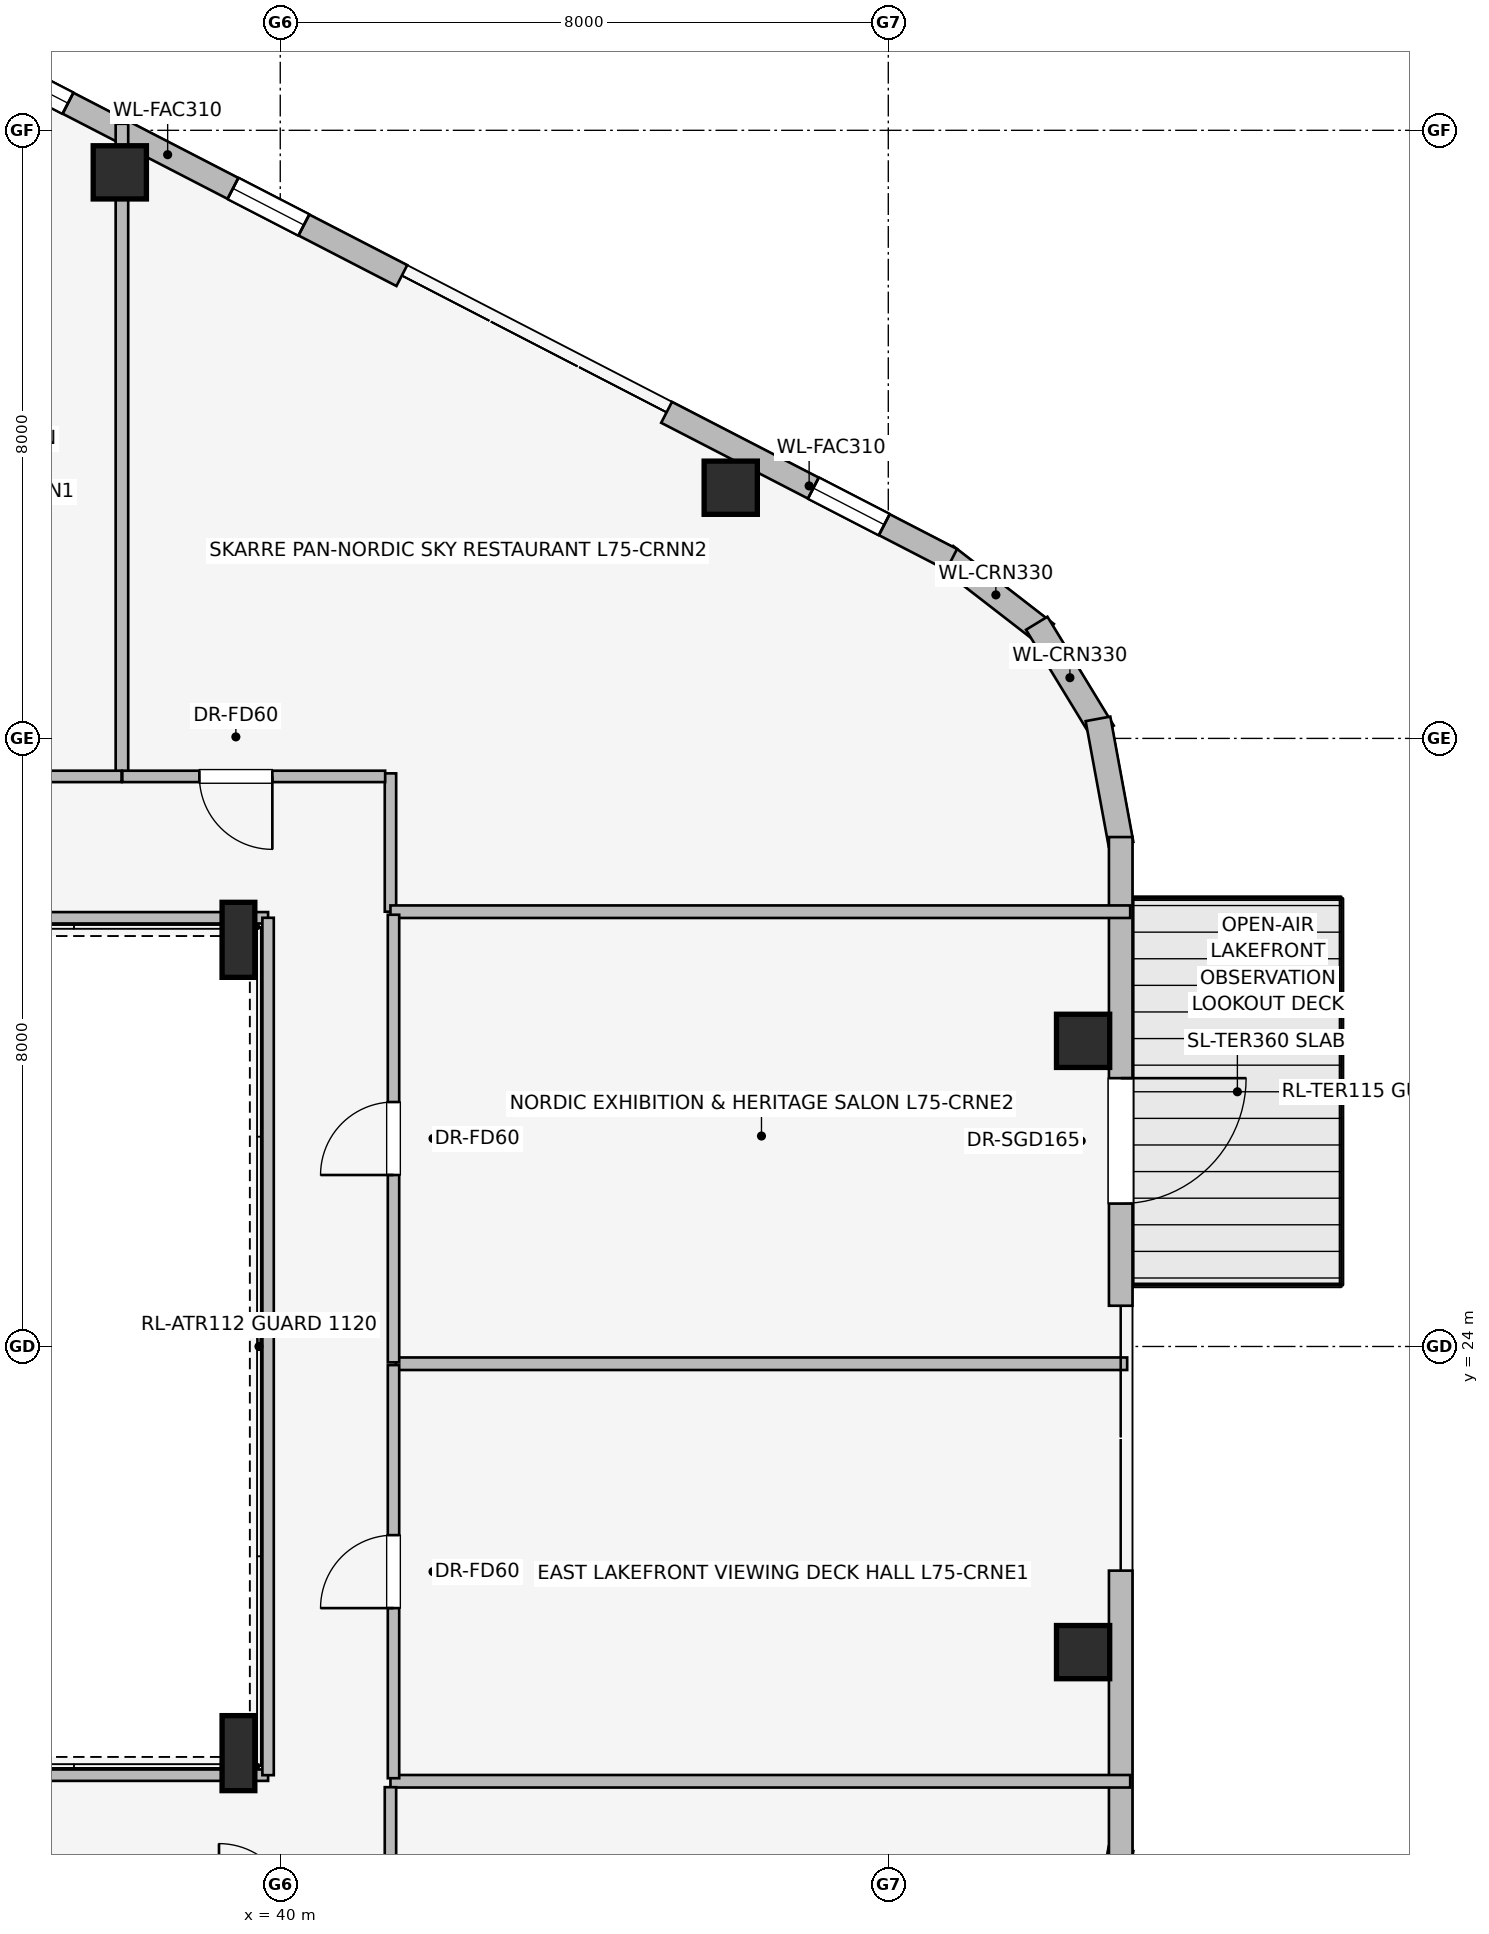
"""IFC4 building model, lengths in metres.
Left out: names, types, materials, properties, quantities, classifications, styles, units other than length and angle.
Written with IfcOpenShell. Run it as: python <this file> out.ifc"""

import sys

from ifc_helpers import new_model, si_unit, direction, frame, frame_2d, origin, origin_2d, place, context, subcontext, project, spatial, rectangle, i_section, extrude, element, fill, save


model = new_model("IFC4")
c1 = context("Model", 3, precision=1e-05, world=origin(), true_north=direction((0.0, 1.0)))
c2 = subcontext(c1, "Body", "Model", "MODEL_VIEW")
j1 = project(units=[si_unit("LENGTHUNIT", "METRE"), si_unit("PLANEANGLEUNIT", "RADIAN")], contexts=[c1])
p1 = place(None, origin())
s1 = spatial("IfcSite", under=j1, at=p1, CompositionType="ELEMENT")
p2 = place(p1, origin())
s2 = spatial("IfcBuilding", under=s1, at=p2, CompositionType="ELEMENT")
p3 = place(p2, frame((0.0, 0.0, 275.1)))
s3 = spatial("IfcBuildingStorey", under=s2, at=p3, CompositionType="ELEMENT", Elevation=275.1)
for number, where, z_axis, x_axis in (
    (1, (45.927, 35.298, 0.0), (0.0, 0.0, 1.0), (1.0, 0.0, 0.0)),
    (2, (37.889, 39.447, 0.0), (0.0, 0.0, 1.0), (1.0, 0.0, 0.0)),
    (3, (50.563, 19.979, 0.0), (0.0, 0.0, 1.0), (1.0, 0.0, 0.0)),
    (4, (50.563, 28.021, 0.0), (0.0, 0.0, 1.0), (1.0, 0.0, 0.0)),
):
    element("IfcColumn", number, at=place(p3, frame(where, z_axis=z_axis, x_axis=x_axis)), inside=s3, PredefinedType="COLUMN", context=c2, shape_type="SweptSolid", body=[
        extrude(rectangle(XDim=0.7, YDim=0.7, at=origin_2d()), origin(), (0.0, 0.0, 1.0), 4.8),
    ])
for number, where, z_axis, x_axis in (
    (5, (39.45, 18.65, 0.0), (0.0, 0.0, 1.0), (1.0, 0.0, 0.0)),
    (6, (39.45, 29.35, 0.0), (0.0, 0.0, 1.0), (1.0, 0.0, 0.0)),
):
    element("IfcColumn", number, at=place(p3, frame(where, z_axis=z_axis, x_axis=x_axis)), inside=s3, PredefinedType="COLUMN", context=c2, shape_type="SweptSolid", body=[
        extrude(i_section(OverallWidth=0.431, OverallDepth=0.987, WebThickness=0.034, FlangeThickness=0.062, at=origin_2d()), origin(), (0.0, 0.0, 1.0), 4.8),
    ])
p4 = place(p3, frame((48.753, 34.401, 0.0), z_axis=(0.0, 0.0, 1.0), x_axis=(0.790691856293, -0.61221433207, 0.0)))
e7 = element("IfcWall", 7, at=p4, inside=s3, PredefinedType="STANDARD", context=c2, shape_type="SweptSolid", body=[
    extrude(rectangle(XDim=1.676, YDim=0.33, at=frame_2d((0.838, 0.0))), origin(), (0.0, 0.0, 1.0), 4.49),
])
p5 = place(p3, frame((49.953, 33.515, 0.0), z_axis=(0.0, 0.0, 1.0), x_axis=(0.520325409202, -0.853968072318, 0.0)))
e8 = element("IfcWall", 8, at=p5, inside=s3, PredefinedType="STANDARD", context=c2, shape_type="SweptSolid", body=[
    extrude(rectangle(XDim=1.678, YDim=0.33, at=frame_2d((0.839, 0.0))), origin(), (0.0, 0.0, 1.0), 4.49),
])
p6 = place(p3, frame((50.759, 32.257, 0.0), z_axis=(0.0, 0.0, 1.0), x_axis=(0.180691763044, -0.983539773862, 0.0)))
e9 = element("IfcWall", 9, at=p6, inside=s3, PredefinedType="STANDARD", context=c2, shape_type="SweptSolid", body=[
    extrude(rectangle(XDim=1.677, YDim=0.33, at=frame_2d((0.838, 0.0))), origin(), (0.0, 0.0, 1.0), 4.49),
])
p7 = place(p3, frame((35.437, 41.27, 0.0), z_axis=(0.0, 0.0, 1.0), x_axis=(0.888622971019, -0.458638436437, 0.0)))
e10 = element("IfcWall", 10, at=p7, inside=s3, PredefinedType="STANDARD", context=c2, shape_type="SweptSolid", body=[
    extrude(rectangle(XDim=6.936, YDim=0.31, at=frame_2d((3.468, 0.0))), origin(), (0.0, 0.0, 1.0), 4.49),
])
p8 = place(p7, frame((0.942, 0.0, 0.75)))
e11 = element("IfcOpeningElement", 11, at=p8, cuts=e10, PredefinedType="OPENING", context=c2, shape_type="SweptSolid", body=[
    extrude(rectangle(XDim=1.05, YDim=1.4, at=frame_2d((0.525, 0.7))), frame((0.0, 0.165, 0.0), z_axis=(0.0, -1.0, 0.0), x_axis=(1.0, 0.0, 0.0)), (0.0, 0.0, 1.0), 0.33),
])
p9 = place(p7, frame((4.435, 0.0, 0.75)))
e12 = element("IfcOpeningElement", 12, at=p9, cuts=e10, PredefinedType="OPENING", context=c2, shape_type="SweptSolid", body=[
    extrude(rectangle(XDim=1.05, YDim=1.4, at=frame_2d((0.525, 0.7))), frame((0.0, 0.165, 0.0), z_axis=(0.0, -1.0, 0.0), x_axis=(1.0, 0.0, 0.0)), (0.0, 0.0, 1.0), 0.33),
])
p10 = place(p3, frame((45.083, 36.29, 0.0), z_axis=(0.0, 0.0, 1.0), x_axis=(0.888616094641, -0.45865175934, 0.0)))
e13 = element("IfcWall", 13, at=p10, inside=s3, PredefinedType="STANDARD", context=c2, shape_type="SweptSolid", body=[
    extrude(rectangle(XDim=4.221, YDim=0.31, at=frame_2d((2.111, 0.0))), origin(), (0.0, 0.0, 1.0), 4.49),
])
p11 = place(p10, frame((2.173, 0.0, 0.75)))
e14 = element("IfcOpeningElement", 14, at=p11, cuts=e13, PredefinedType="OPENING", context=c2, shape_type="SweptSolid", body=[
    extrude(rectangle(XDim=1.05, YDim=1.4, at=frame_2d((0.525, 0.7))), frame((0.0, 0.165, 0.0), z_axis=(0.0, -1.0, 0.0), x_axis=(1.0, 0.0, 0.0)), (0.0, 0.0, 1.0), 0.33),
])
p12 = place(p3, frame((51.062, 17.392, 0.0), z_axis=(0.0, 0.0, 1.0), x_axis=(-0.180691763044, -0.983539773862, 0.0)))
e15 = element("IfcWall", 15, at=p12, inside=s3, PredefinedType="STANDARD", context=c2, shape_type="SweptSolid", body=[
    extrude(rectangle(XDim=1.677, YDim=0.33, at=frame_2d((0.838, 0.0))), origin(), (0.0, 0.0, 1.0), 4.49),
])
p13 = place(p3, frame((51.058, 30.702, 0.0), z_axis=(0.0, 0.0, 1.0), x_axis=(0.0, -1.0, 0.0)))
e16 = element("IfcWall", 16, at=p13, inside=s3, PredefinedType="STANDARD", context=c2, shape_type="SweptSolid", body=[
    extrude(rectangle(XDim=6.166, YDim=0.31, at=frame_2d((3.083, 0.0))), origin(), (0.0, 0.0, 1.0), 4.49),
])
p14 = place(p13, frame((3.172, 0.0, 0.0)))
e17 = element("IfcOpeningElement", 17, at=p14, cuts=e16, PredefinedType="OPENING", context=c2, shape_type="SweptSolid", body=[
    extrude(rectangle(XDim=1.65, YDim=2.25, at=frame_2d((0.825, 1.125))), frame((0.0, 0.165, 0.0), z_axis=(0.0, -1.0, 0.0), x_axis=(1.0, 0.0, 0.0)), (0.0, 0.0, 1.0), 0.33),
])
p15 = place(p3, frame((51.058, 21.051, 0.0), z_axis=(0.0, 0.0, 1.0), x_axis=(0.0, -1.0, 0.0)))
e18 = element("IfcWall", 18, at=p15, inside=s3, PredefinedType="STANDARD", context=c2, shape_type="SweptSolid", body=[
    extrude(rectangle(XDim=3.753, YDim=0.31, at=frame_2d((1.876, 0.0))), origin(), (0.0, 0.0, 1.0), 4.49),
])
p16 = place(p3, frame((27.675, 18.36, 0.0), z_axis=(0.0, 0.0, 1.0), x_axis=(1.0, 0.0, 0.0)))
e19 = element("IfcWall", 19, at=p16, inside=s3, PredefinedType="PARTITIONING", context=c2, shape_type="SweptSolid", body=[
    extrude(rectangle(XDim=12.165, YDim=0.15, at=frame_2d((6.083, 0.0))), origin(), (0.0, 0.0, 1.0), 3.631),
])
p17 = place(p3, frame((39.84, 29.64, 0.0), z_axis=(0.0, 0.0, 1.0), x_axis=(-1.0, 0.0, 0.0)))
e20 = element("IfcWall", 20, at=p17, inside=s3, PredefinedType="PARTITIONING", context=c2, shape_type="SweptSolid", body=[
    extrude(rectangle(XDim=12.203, YDim=0.15, at=frame_2d((6.102, 0.0))), origin(), (0.0, 0.0, 1.0), 3.631),
])
p18 = place(p3, frame((39.84, 18.36, 0.0), z_axis=(0.0, 0.0, 1.0), x_axis=(0.0, 1.0, 0.0)))
e21 = element("IfcWall", 21, at=p18, inside=s3, PredefinedType="PARTITIONING", context=c2, shape_type="SweptSolid", body=[
    extrude(rectangle(XDim=11.28, YDim=0.15, at=frame_2d((5.64, 0.0))), origin(), (0.0, 0.0, 1.0), 4.49),
])
p19 = place(p3, frame((41.45, 29.72, 0.0), z_axis=(0.0, 0.0, 1.0), x_axis=(0.0, 1.0, 0.0)))
e22 = element("IfcWall", 22, at=p19, inside=s3, PredefinedType="PARTITIONING", context=c2, shape_type="SweptSolid", body=[
    extrude(rectangle(XDim=1.82, YDim=0.15, at=frame_2d((0.91, 0.0))), origin(), (0.0, 0.0, 1.0), 4.49),
])
p20 = place(p3, frame((37.917, 31.51, 0.0), z_axis=(0.0, 0.0, 1.0), x_axis=(0.0, 1.0, 0.0)))
e23 = element("IfcWall", 23, at=p20, inside=s3, PredefinedType="PARTITIONING", context=c2, shape_type="SweptSolid", body=[
    extrude(rectangle(XDim=8.576, YDim=0.165, at=frame_2d((4.288, 0.0))), origin(), (0.0, 0.0, 1.0), 3.879),
])
p21 = place(p3, frame((37.912, 31.5, 0.0), z_axis=(0.0, 0.0, 1.0), x_axis=(-1.0, 0.0, 0.0)))
e24 = element("IfcWall", 24, at=p21, inside=s3, PredefinedType="PARTITIONING", context=c2, shape_type="SweptSolid", body=[
    extrude(rectangle(XDim=3.795, YDim=0.15, at=frame_2d((1.897, 0.0))), origin(), (0.0, 0.0, 1.0), 4.49),
])
p22 = place(p21, frame((1.212, 0.0, 0.0)))
e25 = element("IfcOpeningElement", 25, at=p22, cuts=e24, PredefinedType="OPENING", context=c2, shape_type="SweptSolid", body=[
    extrude(rectangle(XDim=0.96, YDim=2.0, at=frame_2d((0.48, 1.0))), frame((0.0, 0.085, 0.0), z_axis=(0.0, -1.0, 0.0), x_axis=(1.0, 0.0, 0.0)), (0.0, 0.0, 1.0), 0.17),
])
p23 = place(p3, frame((41.38, 31.5, 0.0), z_axis=(0.0, 0.0, 1.0), x_axis=(-1.0, 0.0, 0.0)))
e26 = element("IfcWall", 26, at=p23, inside=s3, PredefinedType="PARTITIONING", context=c2, shape_type="SweptSolid", body=[
    extrude(rectangle(XDim=3.458, YDim=0.15, at=frame_2d((1.729, 0.0))), origin(), (0.0, 0.0, 1.0), 4.49),
])
p24 = place(p23, frame((1.484, 0.0, 0.0)))
e27 = element("IfcOpeningElement", 27, at=p24, cuts=e26, PredefinedType="OPENING", context=c2, shape_type="SweptSolid", body=[
    extrude(rectangle(XDim=0.96, YDim=2.0, at=frame_2d((0.48, 1.0))), frame((0.0, 0.085, 0.0), z_axis=(0.0, -1.0, 0.0), x_axis=(1.0, 0.0, 0.0)), (0.0, 0.0, 1.0), 0.17),
])
for number, where, z_axis, x_axis in (
    (28, (41.45, 18.28, 0.0), (0.0, 0.0, 1.0), (1.0, 0.0, 0.0)),
    (29, (41.45, 29.72, 0.0), (0.0, 0.0, 1.0), (1.0, 0.0, 0.0)),
):
    element("IfcWall", number, at=place(p3, frame(where, z_axis=z_axis, x_axis=x_axis)), inside=s3, PredefinedType="PARTITIONING", context=c2, shape_type="SweptSolid", body=[
        extrude(rectangle(XDim=9.733, YDim=0.165, at=frame_2d((4.867, 0.0))), origin(), (0.0, 0.0, 1.0), 4.49),
    ])
p25 = place(p3, frame((41.52, 23.773, 0.0), z_axis=(0.0, 0.0, 1.0), x_axis=(1.0, 0.0, 0.0)))
e30 = element("IfcWall", 30, at=p25, inside=s3, PredefinedType="PARTITIONING", context=c2, shape_type="SweptSolid", body=[
    extrude(rectangle(XDim=9.623, YDim=0.165, at=frame_2d((4.812, 0.0))), origin(), (0.0, 0.0, 1.0), 4.49),
])
p26 = place(p3, frame((41.49, 18.32, 0.0), z_axis=(0.0, 0.0, 1.0), x_axis=(0.0, 1.0, 0.0)))
e31 = element("IfcWall", 31, at=p26, inside=s3, PredefinedType="PARTITIONING", context=c2, shape_type="SweptSolid", body=[
    extrude(rectangle(XDim=5.435, YDim=0.15, at=frame_2d((2.717, 0.0))), origin(), (0.0, 0.0, 1.0), 4.49),
])
p27 = place(p26, frame((2.238, 0.0, 0.0)))
e32 = element("IfcOpeningElement", 32, at=p27, cuts=e31, PredefinedType="OPENING", context=c2, shape_type="SweptSolid", body=[
    extrude(rectangle(XDim=0.96, YDim=2.0, at=frame_2d((0.48, 1.0))), frame((0.0, 0.085, 0.0), z_axis=(0.0, -1.0, 0.0), x_axis=(1.0, 0.0, 0.0)), (0.0, 0.0, 1.0), 0.17),
])
p28 = place(p3, frame((41.49, 23.791, 0.0), z_axis=(0.0, 0.0, 1.0), x_axis=(0.0, 1.0, 0.0)))
e33 = element("IfcWall", 33, at=p28, inside=s3, PredefinedType="PARTITIONING", context=c2, shape_type="SweptSolid", body=[
    extrude(rectangle(XDim=5.889, YDim=0.15, at=frame_2d((2.944, 0.0))), origin(), (0.0, 0.0, 1.0), 4.49),
])
p29 = place(p28, frame((2.465, 0.0, 0.0)))
e34 = element("IfcOpeningElement", 34, at=p29, cuts=e33, PredefinedType="OPENING", context=c2, shape_type="SweptSolid", body=[
    extrude(rectangle(XDim=0.96, YDim=2.0, at=frame_2d((0.48, 1.0))), frame((0.0, 0.085, 0.0), z_axis=(0.0, -1.0, 0.0), x_axis=(1.0, 0.0, 0.0)), (0.0, 0.0, 1.0), 0.17),
])
p30 = place(p3, frame((41.45, 16.46, 0.0), z_axis=(0.0, 0.0, 1.0), x_axis=(0.0, 1.0, 0.0)))
e35 = element("IfcWall", 35, at=p30, inside=s3, PredefinedType="PARTITIONING", context=c2, shape_type="SweptSolid", body=[
    extrude(rectangle(XDim=1.742, YDim=0.15, at=frame_2d((0.871, 0.0))), origin(), (0.0, 0.0, 1.0), 4.49),
])
p31 = place(p8, origin())
e36 = element("IfcWindow", 36, at=p31, inside=s3, PartitioningType="SINGLE_PANEL", PredefinedType="WINDOW", context=c2, shape_type="SweptSolid", body=[
    extrude(rectangle(XDim=1.05, YDim=1.4, at=frame_2d((0.525, 0.7))), frame((0.0, 0.03, 0.0), z_axis=(0.0, -1.0, 0.0), x_axis=(1.0, 0.0, 0.0)), (0.0, 0.0, 1.0), 0.06),
])
fill(e11, e36)
p32 = place(p9, origin())
e37 = element("IfcWindow", 37, at=p32, inside=s3, PartitioningType="SINGLE_PANEL", PredefinedType="WINDOW", context=c2, shape_type="SweptSolid", body=[
    extrude(rectangle(XDim=1.05, YDim=1.4, at=frame_2d((0.525, 0.7))), frame((0.0, 0.03, 0.0), z_axis=(0.0, -1.0, 0.0), x_axis=(1.0, 0.0, 0.0)), (0.0, 0.0, 1.0), 0.06),
])
fill(e12, e37)
p33 = place(p11, origin())
e38 = element("IfcWindow", 38, at=p33, inside=s3, PartitioningType="SINGLE_PANEL", PredefinedType="WINDOW", context=c2, shape_type="SweptSolid", body=[
    extrude(rectangle(XDim=1.05, YDim=1.4, at=frame_2d((0.525, 0.7))), frame((0.0, 0.03, 0.0), z_axis=(0.0, -1.0, 0.0), x_axis=(1.0, 0.0, 0.0)), (0.0, 0.0, 1.0), 0.06),
])
fill(e14, e38)
p34 = place(p14, origin())
e39 = element("IfcDoor", 39, at=p34, inside=s3, OperationType="SINGLE_SWING_LEFT", PredefinedType="DOOR", context=c2, shape_type="SweptSolid", body=[
    extrude(rectangle(XDim=1.65, YDim=2.25, at=frame_2d((0.825, 1.125))), frame((0.0, 0.025, 0.0), z_axis=(0.0, -1.0, 0.0), x_axis=(1.0, 0.0, 0.0)), (0.0, 0.0, 1.0), 0.05),
])
fill(e17, e39)
p35 = place(p24, origin())
e40 = element("IfcDoor", 40, at=p35, inside=s3, OperationType="SINGLE_SWING_LEFT", PredefinedType="DOOR", context=c2, shape_type="SweptSolid", body=[
    extrude(rectangle(XDim=0.96, YDim=2.0, at=frame_2d((0.48, 1.0))), frame((0.0, 0.025, 0.0), z_axis=(0.0, -1.0, 0.0), x_axis=(1.0, 0.0, 0.0)), (0.0, 0.0, 1.0), 0.05),
])
fill(e27, e40)
p36 = place(p27, origin())
e41 = element("IfcDoor", 41, at=p36, inside=s3, OperationType="SINGLE_SWING_LEFT", PredefinedType="DOOR", context=c2, shape_type="SweptSolid", body=[
    extrude(rectangle(XDim=0.96, YDim=2.0, at=frame_2d((0.48, 1.0))), frame((0.0, 0.025, 0.0), z_axis=(0.0, -1.0, 0.0), x_axis=(1.0, 0.0, 0.0)), (0.0, 0.0, 1.0), 0.05),
])
fill(e32, e41)
p37 = place(p29, origin())
e42 = element("IfcDoor", 42, at=p37, inside=s3, OperationType="SINGLE_SWING_LEFT", PredefinedType="DOOR", context=c2, shape_type="SweptSolid", body=[
    extrude(rectangle(XDim=0.96, YDim=2.0, at=frame_2d((0.48, 1.0))), frame((0.0, 0.025, 0.0), z_axis=(0.0, -1.0, 0.0), x_axis=(1.0, 0.0, 0.0)), (0.0, 0.0, 1.0), 0.05),
])
fill(e34, e42)
save(model, sys.argv[1])
